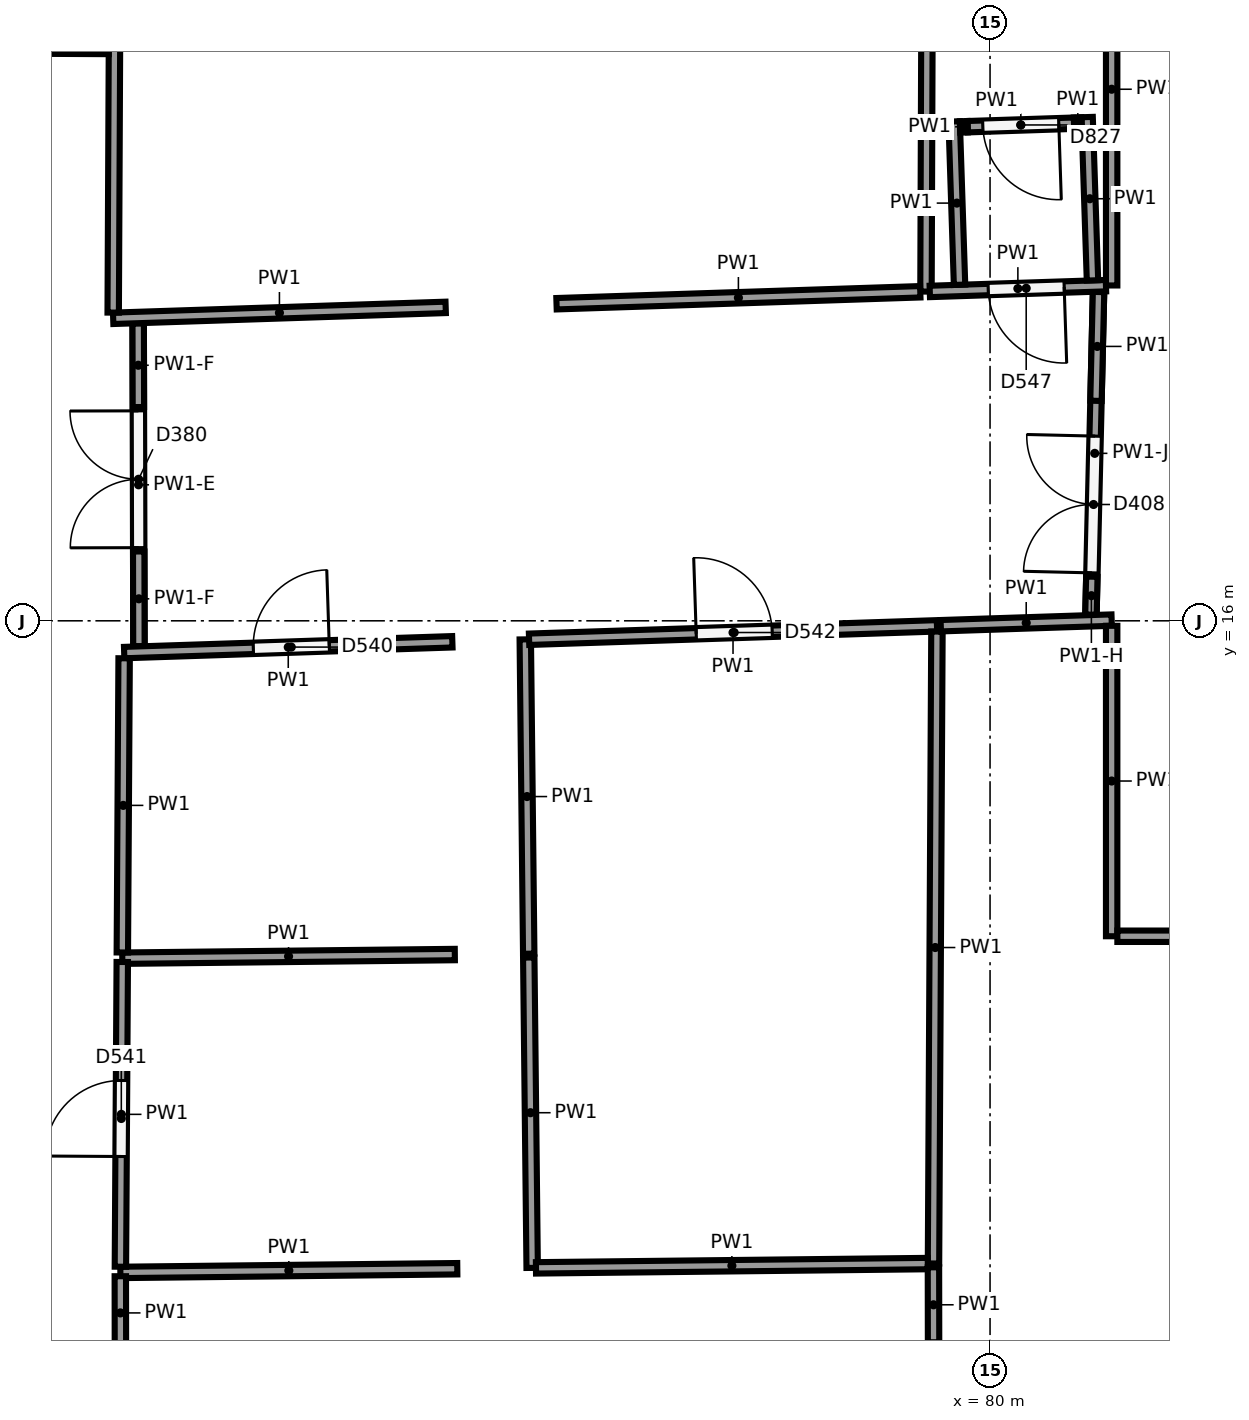
"""IFC4 building model, lengths in metres.
Left out: names, types, materials, properties, quantities, classifications, styles, units other than length and angle.
Written with IfcOpenShell. Run it as: python <this file> out.ifc"""

import sys

from ifc_helpers import new_model, si_unit, direction, frame, frame_2d, origin, origin_2d, place, context, subcontext, project, spatial, rectangle, circle, extrude, element, fill, save


model = new_model("IFC4")
c1 = context("Model", 3, precision=1e-05, world=origin(), true_north=direction((0.0, 1.0)))
c2 = subcontext(c1, "Body", "Model", "MODEL_VIEW")
j1 = project(units=[si_unit("LENGTHUNIT", "METRE"), si_unit("PLANEANGLEUNIT", "RADIAN")], contexts=[c1])
p1 = place(None, origin())
s1 = spatial("IfcSite", under=j1, at=p1, CompositionType="ELEMENT")
p2 = place(p1, origin())
s2 = spatial("IfcBuilding", under=s1, at=p2, CompositionType="ELEMENT")
p3 = place(p2, origin())
s3 = spatial("IfcBuildingStorey", under=s2, at=p3, CompositionType="ELEMENT", Elevation=0.0)
p4 = place(p3, frame((73.482, 17.944, 0.0), z_axis=(0.0, 0.0, 1.0), x_axis=(1.0, 0.0, 0.0)))
e1 = element("IfcColumn", 1, at=p4, inside=s3, PredefinedType="COLUMN", context=c2, shape_type="SweptSolid", body=[
    extrude(circle(Radius=0.45, at=origin_2d()), origin(), (0.0, 0.0, 1.0), 6.5),
])
p5 = place(p3, frame((68.607, 15.582, 0.0), z_axis=(0.0, 0.0, 1.0), x_axis=(0.999457132161, 0.032946031214, 0.0)))
e2 = element("IfcWall", 2, at=p5, inside=s3, PredefinedType="PARTITIONING", context=c2, shape_type="SweptSolid", body=[
    extrude(rectangle(XDim=4.32, YDim=0.15, at=frame_2d((2.16, 0.0))), origin(), (0.0, 0.0, 1.0), 6.15),
])
p6 = place(p5, frame((1.7, 0.0, 0.0)))
e3 = element("IfcOpeningElement", 3, at=p6, cuts=e2, PredefinedType="OPENING", context=c2, shape_type="SweptSolid", body=[
    extrude(rectangle(XDim=1.0, YDim=2.1, at=frame_2d((0.5, 1.05))), frame((0.0, 0.085, 0.0), z_axis=(0.0, -1.0, 0.0), x_axis=(1.0, 0.0, 0.0)), (0.0, 0.0, 1.0), 0.17),
])
p7 = place(p3, frame((73.885, 15.756, 0.0), z_axis=(0.0, 0.0, 1.0), x_axis=(0.010979915445, -0.999939718912, 0.0)))
e4 = element("IfcWall", 4, at=p7, inside=s3, PredefinedType="PARTITIONING", context=c2, shape_type="SweptSolid", body=[
    extrude(rectangle(XDim=4.136, YDim=0.15, at=frame_2d((2.068, 0.0))), origin(), (0.0, 0.0, 1.0), 6.15),
])
p8 = place(p3, frame((72.958, 11.609, 0.0), z_axis=(0.0, 0.0, 1.0), x_axis=(-0.999939585857, -0.010992026026, 0.0)))
e5 = element("IfcWall", 5, at=p8, inside=s3, PredefinedType="PARTITIONING", context=c2, shape_type="SweptSolid", body=[
    extrude(rectangle(XDim=4.375, YDim=0.15, at=frame_2d((2.188, 0.0))), origin(), (0.0, 0.0, 1.0), 6.15),
])
p9 = place(p3, frame((68.583, 11.636, 0.0), z_axis=(0.0, 0.0, 1.0), x_axis=(0.006118601165, 0.999981281185, 0.0)))
e6 = element("IfcWall", 6, at=p9, inside=s3, PredefinedType="PARTITIONING", context=c2, shape_type="SweptSolid", body=[
    extrude(rectangle(XDim=3.87, YDim=0.15, at=frame_2d((1.935, 0.0))), origin(), (0.0, 0.0, 1.0), 6.15),
])
p10 = place(p3, frame((73.931, 11.57, 0.0), z_axis=(0.0, 0.0, 1.0), x_axis=(0.010941049119, -0.999940144931, 0.0)))
e7 = element("IfcWall", 7, at=p10, inside=s3, PredefinedType="PARTITIONING", context=c2, shape_type="SweptSolid", body=[
    extrude(rectangle(XDim=4.083, YDim=0.15, at=frame_2d((2.042, 0.0))), origin(), (0.0, 0.0, 1.0), 6.15),
])
p11 = place(p3, frame((72.99, 7.476, 0.0), z_axis=(0.0, 0.0, 1.0), x_axis=(-0.999939945045, -0.010959302146, 0.0)))
e8 = element("IfcWall", 8, at=p11, inside=s3, PredefinedType="PARTITIONING", context=c2, shape_type="SweptSolid", body=[
    extrude(rectangle(XDim=4.433, YDim=0.15, at=frame_2d((2.217, 0.0))), origin(), (0.0, 0.0, 1.0), 6.15),
])
p12 = place(p3, frame((68.558, 7.502, 0.0), z_axis=(0.0, 0.0, 1.0), x_axis=(0.006089279382, 0.999981460166, 0.0)))
e9 = element("IfcWall", 9, at=p12, inside=s3, PredefinedType="PARTITIONING", context=c2, shape_type="SweptSolid", body=[
    extrude(rectangle(XDim=4.009, YDim=0.15, at=frame_2d((2.005, 0.0))), origin(), (0.0, 0.0, 1.0), 6.15),
])
p13 = place(p12, frame((1.45, 0.0, 0.0)))
e10 = element("IfcOpeningElement", 10, at=p13, cuts=e9, PredefinedType="OPENING", context=c2, shape_type="SweptSolid", body=[
    extrude(rectangle(XDim=1.0, YDim=2.1, at=frame_2d((0.5, 1.05))), frame((0.0, 0.085, 0.0), z_axis=(0.0, -1.0, 0.0), x_axis=(1.0, 0.0, 0.0)), (0.0, 0.0, 1.0), 0.17),
])
p14 = place(p3, frame((73.935, 15.757, 0.0), z_axis=(0.0, 0.0, 1.0), x_axis=(0.999459593549, 0.032871277175, 0.0)))
e11 = element("IfcWall", 11, at=p14, inside=s3, PredefinedType="PARTITIONING", context=c2, shape_type="SweptSolid", body=[
    extrude(rectangle(XDim=5.37, YDim=0.15, at=frame_2d((2.685, 0.0))), origin(), (0.0, 0.0, 1.0), 6.15),
])
p15 = place(p14, frame((2.2, 0.0, 0.0)))
e12 = element("IfcOpeningElement", 12, at=p15, cuts=e11, PredefinedType="OPENING", context=c2, shape_type="SweptSolid", body=[
    extrude(rectangle(XDim=1.0, YDim=2.1, at=frame_2d((0.5, 1.05))), frame((0.0, 0.085, 0.0), z_axis=(0.0, -1.0, 0.0), x_axis=(1.0, 0.0, 0.0)), (0.0, 0.0, 1.0), 0.17),
])
p16 = place(p3, frame((79.301, 15.859, 0.0), z_axis=(0.0, 0.0, 1.0), x_axis=(-0.005461831962, -0.999985084085, 0.0)))
e13 = element("IfcWall", 13, at=p16, inside=s3, PredefinedType="PARTITIONING", context=c2, shape_type="SweptSolid", body=[
    extrude(rectangle(XDim=8.314, YDim=0.15, at=frame_2d((4.157, 0.0))), origin(), (0.0, 0.0, 1.0), 6.15),
])
p17 = place(p3, frame((79.181, 7.544, 0.0), z_axis=(0.0, 0.0, 1.0), x_axis=(-0.999940168254, -0.010938917355, 0.0)))
e14 = element("IfcWall", 14, at=p17, inside=s3, PredefinedType="PARTITIONING", context=c2, shape_type="SweptSolid", body=[
    extrude(rectangle(XDim=5.156, YDim=0.15, at=frame_2d((2.578, 0.0))), origin(), (0.0, 0.0, 1.0), 6.15),
])
p18 = place(p3, frame((79.255, 7.495, 0.0), z_axis=(0.0, 0.0, 1.0), x_axis=(0.001237929232, -0.999999233765, 0.0)))
e15 = element("IfcWall", 15, at=p18, inside=s3, PredefinedType="PARTITIONING", context=c2, shape_type="SweptSolid", body=[
    extrude(rectangle(XDim=0.986, YDim=0.15, at=frame_2d((0.493, 0.0))), origin(), (0.0, 0.0, 1.0), 6.15),
])
p19 = place(p3, frame((68.558, 6.412, 0.0), z_axis=(0.0, 0.0, 1.0), x_axis=(-0.001264221493, 0.999999200872, 0.0)))
e16 = element("IfcWall", 16, at=p19, inside=s3, PredefinedType="PARTITIONING", context=c2, shape_type="SweptSolid", body=[
    extrude(rectangle(XDim=0.966, YDim=0.15, at=frame_2d((0.483, 0.0))), origin(), (0.0, 0.0, 1.0), 6.15),
])
p20 = place(p3, frame((79.352, 15.935, 0.0), z_axis=(0.0, 0.0, 1.0), x_axis=(0.999459266056, 0.032881233183, 0.0)))
e17 = element("IfcWall", 17, at=p20, inside=s3, PredefinedType="PARTITIONING", context=c2, shape_type="SweptSolid", body=[
    extrude(rectangle(XDim=2.25, YDim=0.15, at=frame_2d((1.125, 0.0))), origin(), (0.0, 0.0, 1.0), 6.15),
])
p21 = place(p3, frame((81.6, 15.934, 0.0), z_axis=(0.0, 0.0, 1.0), x_axis=(0.0, -1.0, 0.0)))
e18 = element("IfcWall", 18, at=p21, inside=s3, PredefinedType="PARTITIONING", context=c2, shape_type="SweptSolid", body=[
    extrude(rectangle(XDim=4.084, YDim=0.15, at=frame_2d((2.042, 0.0))), origin(), (0.0, 0.0, 1.0), 6.15),
])
p22 = place(p3, frame((81.675, 11.85, 0.0), z_axis=(0.0, 0.0, 1.0), x_axis=(1.0, 0.0, 0.0)))
e19 = element("IfcWall", 19, at=p22, inside=s3, PredefinedType="PARTITIONING", context=c2, shape_type="SweptSolid", body=[
    extrude(rectangle(XDim=2.908, YDim=0.15, at=frame_2d((1.454, 0.0))), origin(), (0.0, 0.0, 1.0), 6.15),
])
p23 = place(p3, frame((79.191, 29.725, 0.0), z_axis=(0.0, 0.0, 1.0), x_axis=(-0.003612711966, -0.999993474135, 0.0)))
e20 = element("IfcWall", 20, at=p23, inside=s3, PredefinedType="PARTITIONING", context=c2, shape_type="SweptSolid", body=[
    extrude(rectangle(XDim=9.393, YDim=0.15, at=frame_2d((4.697, 0.0))), origin(), (0.0, 0.0, 1.0), 6.15),
])
p24 = place(p3, frame((79.082, 20.329, 0.0), z_axis=(0.0, 0.0, 1.0), x_axis=(-0.999459186373, -0.032883655132, 0.0)))
e21 = element("IfcWall", 21, at=p24, inside=s3, PredefinedType="PARTITIONING", context=c2, shape_type="SweptSolid", body=[
    extrude(rectangle(XDim=4.789, YDim=0.15, at=frame_2d((2.395, 0.0))), origin(), (0.0, 0.0, 1.0), 6.15),
])
p25 = place(p3, frame((72.838, 20.124, 0.0), z_axis=(0.0, 0.0, 1.0), x_axis=(-0.999458381432, -0.032908111225, 0.0)))
e22 = element("IfcWall", 22, at=p25, inside=s3, PredefinedType="PARTITIONING", context=c2, shape_type="SweptSolid", body=[
    extrude(rectangle(XDim=4.377, YDim=0.15, at=frame_2d((2.188, 0.0))), origin(), (0.0, 0.0, 1.0), 6.15),
])
p26 = place(p3, frame((68.463, 20.055, 0.0), z_axis=(0.0, 0.0, 1.0), x_axis=(0.004750858989, 0.999988714606, 0.0)))
e23 = element("IfcWall", 23, at=p26, inside=s3, PredefinedType="PARTITIONING", context=c2, shape_type="SweptSolid", body=[
    extrude(rectangle(XDim=9.096, YDim=0.15, at=frame_2d((4.548, 0.0))), origin(), (0.0, 0.0, 1.0), 6.15),
])
p27 = place(p26, frame((3.95, 0.0, 0.0)))
e24 = element("IfcOpeningElement", 24, at=p27, cuts=e23, PredefinedType="OPENING", context=c2, shape_type="SweptSolid", body=[
    extrude(rectangle(XDim=1.2, YDim=2.1, at=frame_2d((0.6, 1.05))), frame((0.0, 0.085, 0.0), z_axis=(0.0, -1.0, 0.0), x_axis=(1.0, 0.0, 0.0)), (0.0, 0.0, 1.0), 0.17),
])
p28 = place(p3, frame((81.6, 25.575, 0.0), z_axis=(0.0, 0.0, 1.0), x_axis=(0.0, -1.0, 0.0)))
e25 = element("IfcWall", 25, at=p28, inside=s3, PredefinedType="PARTITIONING", context=c2, shape_type="SweptSolid", body=[
    extrude(rectangle(XDim=5.163, YDim=0.15, at=frame_2d((2.582, 0.0))), origin(), (0.0, 0.0, 1.0), 6.15),
])
p29 = place(p3, frame((81.525, 20.409, 0.0), z_axis=(0.0, 0.0, 1.0), x_axis=(-0.999460453172, -0.032845129702, 0.0)))
e26 = element("IfcWall", 26, at=p29, inside=s3, PredefinedType="PARTITIONING", context=c2, shape_type="SweptSolid", body=[
    extrude(rectangle(XDim=2.319, YDim=0.15, at=frame_2d((1.16, 0.0))), origin(), (0.0, 0.0, 1.0), 6.15),
])
p30 = place(p29, frame((0.55, 0.0, 0.0)))
e27 = element("IfcOpeningElement", 27, at=p30, cuts=e26, PredefinedType="OPENING", context=c2, shape_type="SweptSolid", body=[
    extrude(rectangle(XDim=1.0, YDim=2.1, at=frame_2d((0.5, 1.05))), frame((0.0, 0.085, 0.0), z_axis=(0.0, -1.0, 0.0), x_axis=(1.0, 0.0, 0.0)), (0.0, 0.0, 1.0), 0.17),
])
p31 = place(p3, frame((68.405, 23.53, 0.0), z_axis=(0.0, 0.0, 1.0), x_axis=(-0.999988600724, 0.004774769228, 0.0)))
e28 = element("IfcWall", 28, at=p31, inside=s3, PredefinedType="PARTITIONING", context=c2, shape_type="SweptSolid", body=[
    extrude(rectangle(XDim=2.25, YDim=0.15, at=frame_2d((1.125, 0.0))), origin(), (0.0, 0.0, 1.0), 6.15),
])
p32 = place(p3, frame((81.348, 20.479, 0.0), z_axis=(0.0, 0.0, 1.0), x_axis=(-0.032819488058, 0.999461295501, 0.0)))
e29 = element("IfcWall", 29, at=p32, inside=s3, PredefinedType="PARTITIONING", context=c2, shape_type="SweptSolid", body=[
    extrude(rectangle(XDim=2.15, YDim=0.15, at=frame_2d((1.075, 0.0))), origin(), (0.0, 0.0, 1.0), 6.15),
])
p33 = place(p3, frame((79.599, 20.421, 0.0), z_axis=(0.0, 0.0, 1.0), x_axis=(-0.032929189875, 0.999457687175, 0.0)))
e30 = element("IfcWall", 30, at=p33, inside=s3, PredefinedType="PARTITIONING", context=c2, shape_type="SweptSolid", body=[
    extrude(rectangle(XDim=2.15, YDim=0.15, at=frame_2d((1.075, 0.0))), origin(), (0.0, 0.0, 1.0), 6.15),
])
p34 = place(p3, frame((81.205, 22.55, 0.0), z_axis=(0.0, 0.0, 1.0), x_axis=(-0.999417522997, -0.034126452005, 0.0)))
e31 = element("IfcWall", 31, at=p34, inside=s3, PredefinedType="PARTITIONING", context=c2, shape_type="SweptSolid", body=[
    extrude(rectangle(XDim=0.1, YDim=0.15, at=frame_2d((0.05, 0.0))), origin(), (0.0, 0.0, 1.0), 6.15),
])
p35 = place(p3, frame((81.104, 22.546, 0.0), z_axis=(0.0, 0.0, 1.0), x_axis=(-0.999462381074, -0.032786412082, 0.0)))
e32 = element("IfcWall", 32, at=p35, inside=s3, PredefinedType="PARTITIONING", context=c2, shape_type="SweptSolid", body=[
    extrude(rectangle(XDim=1.4, YDim=0.15, at=frame_2d((0.7, 0.0))), origin(), (0.0, 0.0, 1.0), 6.15),
])
p36 = place(p35, frame((0.2, 0.0, 0.0)))
e33 = element("IfcOpeningElement", 33, at=p36, cuts=e32, PredefinedType="OPENING", context=c2, shape_type="SweptSolid", body=[
    extrude(rectangle(XDim=1.0, YDim=2.1, at=frame_2d((0.5, 1.05))), frame((0.0, 0.085, 0.0), z_axis=(0.0, -1.0, 0.0), x_axis=(1.0, 0.0, 0.0)), (0.0, 0.0, 1.0), 0.17),
])
p37 = place(p3, frame((79.705, 22.5, 0.0), z_axis=(0.0, 0.0, 1.0), x_axis=(-0.999495244364, -0.031768797498, 0.0)))
e34 = element("IfcWall", 34, at=p37, inside=s3, PredefinedType="PARTITIONING", context=c2, shape_type="SweptSolid", body=[
    extrude(rectangle(XDim=0.1, YDim=0.15, at=frame_2d((0.05, 0.0))), origin(), (0.0, 0.0, 1.0), 6.15),
])
p38 = place(p3, frame((81.327, 16.081, 0.0), z_axis=(0.0, 0.0, 1.0), x_axis=(0.023572927834, 0.999722119928, 0.0)))
e35 = element("IfcWall", 35, at=p38, inside=s3, PredefinedType="PARTITIONING", context=c2, shape_type="SweptSolid", body=[
    extrude(rectangle(XDim=4.246, YDim=0.15, at=frame_2d((2.123, 0.0))), origin(), (0.0, 0.0, 1.0), 5.05),
])
p39 = place(p38, frame((0.55, 0.0, 0.0)))
e36 = element("IfcOpeningElement", 36, at=p39, cuts=e35, PredefinedType="OPENING", context=c2, shape_type="SweptSolid", body=[
    extrude(rectangle(XDim=1.8, YDim=2.1, at=frame_2d((0.9, 1.05))), frame((0.0, 0.085, 0.0), z_axis=(0.0, -1.0, 0.0), x_axis=(1.0, 0.0, 0.0)), (0.0, 0.0, 1.0), 0.17),
])
p40 = place(p3, frame((81.327, 16.081, 5.05), z_axis=(0.0, 0.0, 1.0), x_axis=(0.023431065349, 0.999725454901, 0.0)))
e37 = element("IfcWall", 37, at=p40, inside=s3, PredefinedType="PARTITIONING", context=c2, shape_type="SweptSolid", body=[
    extrude(rectangle(XDim=0.5, YDim=0.15, at=frame_2d((0.25, 0.0))), origin(), (0.0, 0.0, 1.0), 1.1),
])
p41 = place(p3, frame((81.394, 18.894, 5.05), z_axis=(0.0, 0.0, 1.0), x_axis=(0.023526910325, 0.999723203937, 0.0)))
e38 = element("IfcWall", 38, at=p41, inside=s3, PredefinedType="PARTITIONING", context=c2, shape_type="SweptSolid", body=[
    extrude(rectangle(XDim=1.432, YDim=0.15, at=frame_2d((0.716, 0.0))), origin(), (0.0, 0.0, 1.0), 1.1),
])
p42 = place(p3, frame((68.802, 15.667, 0.0), z_axis=(0.0, 0.0, 1.0), x_axis=(-0.00224266256, 0.999997485229, 0.0)))
e39 = element("IfcWall", 39, at=p42, inside=s3, PredefinedType="PARTITIONING", context=c2, shape_type="SweptSolid", body=[
    extrude(rectangle(XDim=4.246, YDim=0.15, at=frame_2d((2.123, 0.0))), origin(), (0.0, 0.0, 1.0), 5.25),
])
p43 = place(p42, frame((1.295, 0.0, 0.0)))
e40 = element("IfcOpeningElement", 40, at=p43, cuts=e39, PredefinedType="OPENING", context=c2, shape_type="SweptSolid", body=[
    extrude(rectangle(XDim=1.8, YDim=2.1, at=frame_2d((0.9, 1.05))), frame((0.0, 0.085, 0.0), z_axis=(0.0, -1.0, 0.0), x_axis=(1.0, 0.0, 0.0)), (0.0, 0.0, 1.0), 0.17),
])
p44 = place(p3, frame((68.795, 18.812, 5.25), z_axis=(0.0, 0.0, 1.0), x_axis=(-0.00221925774, 0.999997537445, 0.0)))
e41 = element("IfcWall", 41, at=p44, inside=s3, PredefinedType="PARTITIONING", context=c2, shape_type="SweptSolid", body=[
    extrude(rectangle(XDim=1.1, YDim=0.15, at=frame_2d((0.55, 0.0))), origin(), (0.0, 0.0, 1.0), 0.9),
])
p45 = place(p3, frame((68.802, 15.667, 5.25), z_axis=(0.0, 0.0, 1.0), x_axis=(-0.002352012311, 0.999997234015, 0.0)))
e42 = element("IfcWall", 42, at=p45, inside=s3, PredefinedType="PARTITIONING", context=c2, shape_type="SweptSolid", body=[
    extrude(rectangle(XDim=1.246, YDim=0.15, at=frame_2d((0.623, 0.0))), origin(), (0.0, 0.0, 1.0), 0.9),
])
p46 = place(p6, origin())
e43 = element("IfcDoor", 43, at=p46, inside=s3, OperationType="SINGLE_SWING_RIGHT", PredefinedType="DOOR", context=c2, shape_type="SweptSolid", body=[
    extrude(rectangle(XDim=1.0, YDim=2.1, at=frame_2d((0.5, 1.05))), frame((0.0, 0.025, 0.0), z_axis=(0.0, -1.0, 0.0), x_axis=(1.0, 0.0, 0.0)), (0.0, 0.0, 1.0), 0.05),
])
fill(e3, e43)
p47 = place(p13, origin())
e44 = element("IfcDoor", 44, at=p47, inside=s3, OperationType="SINGLE_SWING_LEFT", PredefinedType="DOOR", context=c2, shape_type="SweptSolid", body=[
    extrude(rectangle(XDim=1.0, YDim=2.1, at=frame_2d((0.5, 1.05))), frame((0.0, 0.025, 0.0), z_axis=(0.0, -1.0, 0.0), x_axis=(1.0, 0.0, 0.0)), (0.0, 0.0, 1.0), 0.05),
])
fill(e10, e44)
p48 = place(p15, origin())
e45 = element("IfcDoor", 45, at=p48, inside=s3, OperationType="SINGLE_SWING_LEFT", PredefinedType="DOOR", context=c2, shape_type="SweptSolid", body=[
    extrude(rectangle(XDim=1.0, YDim=2.1, at=frame_2d((0.5, 1.05))), frame((0.0, 0.025, 0.0), z_axis=(0.0, -1.0, 0.0), x_axis=(1.0, 0.0, 0.0)), (0.0, 0.0, 1.0), 0.05),
])
fill(e12, e45)
p49 = place(p30, origin())
e46 = element("IfcDoor", 46, at=p49, inside=s3, OperationType="SINGLE_SWING_LEFT", PredefinedType="DOOR", context=c2, shape_type="SweptSolid", body=[
    extrude(rectangle(XDim=1.0, YDim=2.1, at=frame_2d((0.5, 1.05))), frame((0.0, 0.025, 0.0), z_axis=(0.0, -1.0, 0.0), x_axis=(1.0, 0.0, 0.0)), (0.0, 0.0, 1.0), 0.05),
])
fill(e27, e46)
p50 = place(p36, origin())
e47 = element("IfcDoor", 47, at=p50, inside=s3, OperationType="SINGLE_SWING_LEFT", PredefinedType="DOOR", context=c2, shape_type="SweptSolid", body=[
    extrude(rectangle(XDim=1.0, YDim=2.1, at=frame_2d((0.5, 1.05))), frame((0.0, 0.025, 0.0), z_axis=(0.0, -1.0, 0.0), x_axis=(1.0, 0.0, 0.0)), (0.0, 0.0, 1.0), 0.05),
])
fill(e33, e47)
p51 = place(p39, origin())
e48 = element("IfcDoor", 48, at=p51, inside=s3, OperationType="DOUBLE_DOOR_SINGLE_SWING", PredefinedType="DOOR", context=c2, shape_type="SweptSolid", body=[
    extrude(rectangle(XDim=1.8, YDim=2.1, at=frame_2d((0.9, 1.05))), frame((0.0, 0.025, 0.0), z_axis=(0.0, -1.0, 0.0), x_axis=(1.0, 0.0, 0.0)), (0.0, 0.0, 1.0), 0.05),
])
fill(e36, e48)
p52 = place(p43, origin())
e49 = element("IfcDoor", 49, at=p52, inside=s3, OperationType="DOUBLE_DOOR_SINGLE_SWING", PredefinedType="DOOR", context=c2, shape_type="SweptSolid", body=[
    extrude(rectangle(XDim=1.8, YDim=2.1, at=frame_2d((0.9, 1.05))), frame((0.0, 0.025, 0.0), z_axis=(0.0, -1.0, 0.0), x_axis=(1.0, 0.0, 0.0)), (0.0, 0.0, 1.0), 0.05),
])
fill(e40, e49)
save(model, sys.argv[1])
